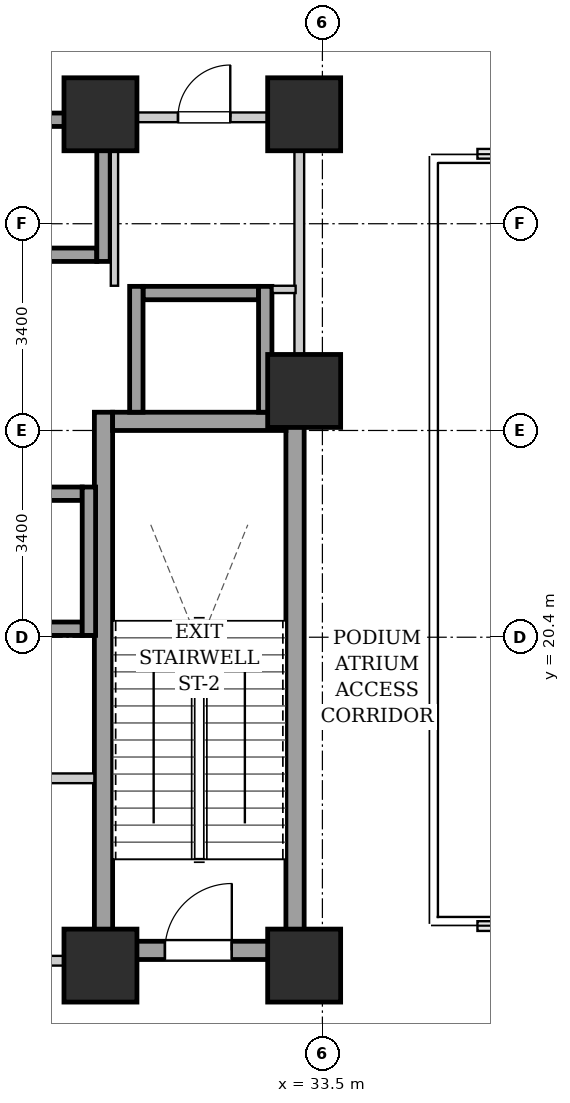
"""IFC4 building model, lengths in metres.
Left out: names, types, materials, properties, quantities, classifications, styles, units other than length and angle.
Written with IfcOpenShell. Run it as: python <this file> out.ifc"""

import sys

from ifc_helpers import new_model, si_unit, direction, frame, frame_2d, origin, origin_2d, place, context, subcontext, project, spatial, rectangle, extrude, element, fill, save


model = new_model("IFC4")
c1 = context("Model", 3, precision=1e-05, world=origin(), true_north=direction((0.0, 1.0)))
c2 = subcontext(c1, "Body", "Model", "MODEL_VIEW")
j1 = project(units=[si_unit("LENGTHUNIT", "METRE"), si_unit("PLANEANGLEUNIT", "RADIAN")], contexts=[c1])
p1 = place(None, origin())
s1 = spatial("IfcSite", under=j1, at=p1, CompositionType="ELEMENT")
p2 = place(p1, origin())
s2 = spatial("IfcBuilding", under=s1, at=p2, CompositionType="ELEMENT")
p3 = place(p2, frame((0.0, 0.0, 6.0)))
s3 = spatial("IfcBuildingStorey", under=s2, at=p3, CompositionType="ELEMENT", Elevation=6.0)
for number, where, z_axis, x_axis in (
    (1, (29.85, 15.0, 0.0), (0.0, 0.0, 1.0), (1.0, 0.0, 0.0)),
    (2, (33.2, 15.0, 0.0), (0.0, 0.0, 1.0), (1.0, 0.0, 0.0)),
    (3, (29.85, 29.0, 0.0), (0.0, 0.0, 1.0), (1.0, 0.0, 0.0)),
    (4, (33.2, 29.0, 0.0), (0.0, 0.0, 1.0), (1.0, 0.0, 0.0)),
    (5, (33.2, 24.45, 0.0), (0.0, 0.0, 1.0), (1.0, 0.0, 0.0)),
):
    element("IfcColumn", number, at=place(p3, frame(where, z_axis=z_axis, x_axis=x_axis)), inside=s3, PredefinedType="COLUMN", context=c2, shape_type="SweptSolid", body=[
        extrude(rectangle(XDim=1.2, YDim=1.2, at=origin_2d()), origin(), (0.0, 0.0, 1.0), 5.2),
    ])
for number, where, z_axis, x_axis in (
    (6, (29.9, 15.1, 0.0), (0.0, 0.0, 1.0), (0.0, 1.0, 0.0)),
    (7, (33.05, 15.1, 0.0), (0.0, 0.0, 1.0), (0.0, 1.0, 0.0)),
):
    element("IfcWall", number, at=place(p3, frame(where, z_axis=z_axis, x_axis=x_axis)), inside=s3, PredefinedType="SHEAR", context=c2, shape_type="SweptSolid", body=[
        extrude(rectangle(XDim=9.0, YDim=0.3, at=frame_2d((4.5, 0.0))), origin(), (0.0, 0.0, 1.0), 4.88),
    ])
p4 = place(p3, frame((30.05, 23.95, 0.0), z_axis=(0.0, 0.0, 1.0), x_axis=(1.0, 0.0, 0.0)))
e8 = element("IfcWall", 8, at=p4, inside=s3, PredefinedType="SHEAR", context=c2, shape_type="SweptSolid", body=[
    extrude(rectangle(XDim=2.85, YDim=0.3, at=frame_2d((1.425, 0.0))), origin(), (0.0, 0.0, 1.0), 4.88),
])
p5 = place(p3, frame((30.05, 15.25, 0.0), z_axis=(0.0, 0.0, 1.0), x_axis=(1.0, 0.0, 0.0)))
e9 = element("IfcWall", 9, at=p5, inside=s3, PredefinedType="SHEAR", context=c2, shape_type="SweptSolid", body=[
    extrude(rectangle(XDim=2.85, YDim=0.3, at=frame_2d((1.425, 0.0))), origin(), (0.0, 0.0, 1.0), 4.88),
])
p6 = place(p5, frame((0.86, 0.0, 0.0)))
e10 = element("IfcOpeningElement", 10, at=p6, cuts=e9, PredefinedType="OPENING", context=c2, shape_type="SweptSolid", body=[
    extrude(rectangle(XDim=1.1, YDim=2.05, at=frame_2d((0.55, 1.025))), frame((0.0, 0.16, 0.0), z_axis=(0.0, -1.0, 0.0), x_axis=(1.0, 0.0, 0.0)), (0.0, 0.0, 1.0), 0.32),
])
for number, where, z_axis, x_axis in (
    (11, (27.93, 26.69, 0.0), (0.0, 0.0, 1.0), (1.0, 0.0, 0.0)),
    (12, (27.93, 28.91, 0.0), (0.0, 0.0, 1.0), (1.0, 0.0, 0.0)),
):
    element("IfcWall", number, at=place(p3, frame(where, z_axis=z_axis, x_axis=x_axis)), inside=s3, PredefinedType="SHEAR", context=c2, shape_type="SweptSolid", body=[
        extrude(rectangle(XDim=1.86, YDim=0.22, at=frame_2d((0.93, 0.0))), origin(), (0.0, 0.0, 1.0), 4.88),
    ])
p7 = place(p3, frame((29.9, 26.58, 0.0), z_axis=(0.0, 0.0, 1.0), x_axis=(0.0, 1.0, 0.0)))
e13 = element("IfcWall", 13, at=p7, inside=s3, PredefinedType="SHEAR", context=c2, shape_type="SweptSolid", body=[
    extrude(rectangle(XDim=2.44, YDim=0.22, at=frame_2d((1.22, 0.0))), origin(), (0.0, 0.0, 1.0), 4.88),
])
for number, where, z_axis, x_axis in (
    (14, (27.65, 20.54, 0.0), (0.0, 0.0, 1.0), (1.0, 0.0, 0.0)),
    (15, (27.65, 22.76, 0.0), (0.0, 0.0, 1.0), (1.0, 0.0, 0.0)),
):
    element("IfcWall", number, at=place(p3, frame(where, z_axis=z_axis, x_axis=x_axis)), inside=s3, PredefinedType="SHEAR", context=c2, shape_type="SweptSolid", body=[
        extrude(rectangle(XDim=1.9, YDim=0.22, at=frame_2d((0.95, 0.0))), origin(), (0.0, 0.0, 1.0), 4.88),
    ])
p8 = place(p3, frame((29.66, 20.43, 0.0), z_axis=(0.0, 0.0, 1.0), x_axis=(0.0, 1.0, 0.0)))
e16 = element("IfcWall", 16, at=p8, inside=s3, PredefinedType="SHEAR", context=c2, shape_type="SweptSolid", body=[
    extrude(rectangle(XDim=2.44, YDim=0.22, at=frame_2d((1.22, 0.0))), origin(), (0.0, 0.0, 1.0), 4.88),
])
p9 = place(p3, frame((30.55, 26.06, 0.0), z_axis=(0.0, 0.0, 1.0), x_axis=(1.0, 0.0, 0.0)))
e17 = element("IfcWall", 17, at=p9, inside=s3, PredefinedType="SHEAR", context=c2, shape_type="SweptSolid", body=[
    extrude(rectangle(XDim=1.9, YDim=0.22, at=frame_2d((0.95, 0.0))), origin(), (0.0, 0.0, 1.0), 4.88),
])
for number, where, z_axis, x_axis in (
    (18, (30.44, 24.1, 0.0), (0.0, 0.0, 1.0), (0.0, 1.0, 0.0)),
    (19, (32.56, 24.1, 0.0), (0.0, 0.0, 1.0), (0.0, 1.0, 0.0)),
):
    element("IfcWall", number, at=place(p3, frame(where, z_axis=z_axis, x_axis=x_axis)), inside=s3, PredefinedType="SHEAR", context=c2, shape_type="SweptSolid", body=[
        extrude(rectangle(XDim=2.07, YDim=0.22, at=frame_2d((1.035, 0.0))), origin(), (0.0, 0.0, 1.0), 4.88),
    ])
p10 = place(p3, frame((21.25, 15.08, 0.0), z_axis=(0.0, 0.0, 1.0), x_axis=(1.0, 0.0, 0.0)))
e20 = element("IfcWall", 20, at=p10, inside=s3, PredefinedType="PARTITIONING", context=c2, shape_type="SweptSolid", body=[
    extrude(rectangle(XDim=8.5, YDim=0.16, at=frame_2d((4.25, 0.0))), origin(), (0.0, 0.0, 1.0), 4.88),
])
p11 = place(p10, frame((3.725, 0.0, 0.0)))
e21 = element("IfcOpeningElement", 21, at=p11, cuts=e20, PredefinedType="OPENING", context=c2, shape_type="SweptSolid", body=[
    extrude(rectangle(XDim=1.05, YDim=2.05, at=frame_2d((0.525, 1.025))), frame((0.0, 0.09, 0.0), z_axis=(0.0, -1.0, 0.0), x_axis=(1.0, 0.0, 0.0)), (0.0, 0.0, 1.0), 0.18),
])
p12 = place(p3, frame((28.65, 18.08, 0.0), z_axis=(0.0, 0.0, 1.0), x_axis=(1.0, 0.0, 0.0)))
e22 = element("IfcWall", 22, at=p12, inside=s3, PredefinedType="PARTITIONING", context=c2, shape_type="SweptSolid", body=[
    extrude(rectangle(XDim=1.1, YDim=0.16, at=frame_2d((0.55, 0.0))), origin(), (0.0, 0.0, 1.0), 4.88),
])
p13 = place(p3, frame((33.12, 24.12, 0.0), z_axis=(0.0, 0.0, 1.0), x_axis=(0.0, 1.0, 0.0)))
e23 = element("IfcWall", 23, at=p13, inside=s3, PredefinedType="PARTITIONING", context=c2, shape_type="SweptSolid", body=[
    extrude(rectangle(XDim=4.76, YDim=0.16, at=frame_2d((2.38, 0.0))), origin(), (0.0, 0.0, 1.0), 4.88),
])
p14 = place(p3, frame((30.08, 26.18, 0.0), z_axis=(0.0, 0.0, 1.0), x_axis=(0.0, 1.0, 0.0)))
e24 = element("IfcWall", 24, at=p14, inside=s3, PredefinedType="PARTITIONING", context=c2, shape_type="SweptSolid", body=[
    extrude(rectangle(XDim=2.68, YDim=0.12, at=frame_2d((1.34, 0.0))), origin(), (0.0, 0.0, 1.0), 4.88),
])
p15 = place(p3, frame((32.68, 26.12, 0.0), z_axis=(0.0, 0.0, 1.0), x_axis=(1.0, 0.0, 0.0)))
e25 = element("IfcWall", 25, at=p15, inside=s3, PredefinedType="PARTITIONING", context=c2, shape_type="SweptSolid", body=[
    extrude(rectangle(XDim=0.38, YDim=0.12, at=frame_2d((0.19, 0.0))), origin(), (0.0, 0.0, 1.0), 4.88),
])
p16 = place(p3, frame((30.08, 28.95, 0.0), z_axis=(0.0, 0.0, 1.0), x_axis=(1.0, 0.0, 0.0)))
e26 = element("IfcWall", 26, at=p16, inside=s3, PredefinedType="PARTITIONING", context=c2, shape_type="SweptSolid", body=[
    extrude(rectangle(XDim=2.96, YDim=0.16, at=frame_2d((1.48, 0.0))), origin(), (0.0, 0.0, 1.0), 4.88),
])
p17 = place(p16, frame((1.045, 0.0, 0.0)))
e27 = element("IfcOpeningElement", 27, at=p17, cuts=e26, PredefinedType="OPENING", context=c2, shape_type="SweptSolid", body=[
    extrude(rectangle(XDim=0.86, YDim=2.05, at=frame_2d((0.43, 1.025))), frame((0.0, 0.09, 0.0), z_axis=(0.0, -1.0, 0.0), x_axis=(1.0, 0.0, 0.0)), (0.0, 0.0, 1.0), 0.18),
])
p18 = place(p6, origin())
e28 = element("IfcDoor", 28, at=p18, inside=s3, OperationType="SINGLE_SWING_RIGHT", PredefinedType="DOOR", context=c2, shape_type="SweptSolid", body=[
    extrude(rectangle(XDim=1.1, YDim=2.05, at=frame_2d((0.55, 1.025))), frame((0.0, 0.025, 0.0), z_axis=(0.0, -1.0, 0.0), x_axis=(1.0, 0.0, 0.0)), (0.0, 0.0, 1.0), 0.05),
])
fill(e10, e28)
p19 = place(p17, origin())
e29 = element("IfcDoor", 29, at=p19, inside=s3, OperationType="SINGLE_SWING_RIGHT", PredefinedType="DOOR", context=c2, shape_type="SweptSolid", body=[
    extrude(rectangle(XDim=0.86, YDim=2.05, at=frame_2d((0.43, 1.025))), frame((0.0, 0.025, 0.0), z_axis=(0.0, -1.0, 0.0), x_axis=(1.0, 0.0, 0.0)), (0.0, 0.0, 1.0), 0.05),
])
fill(e27, e29)
save(model, sys.argv[1])
